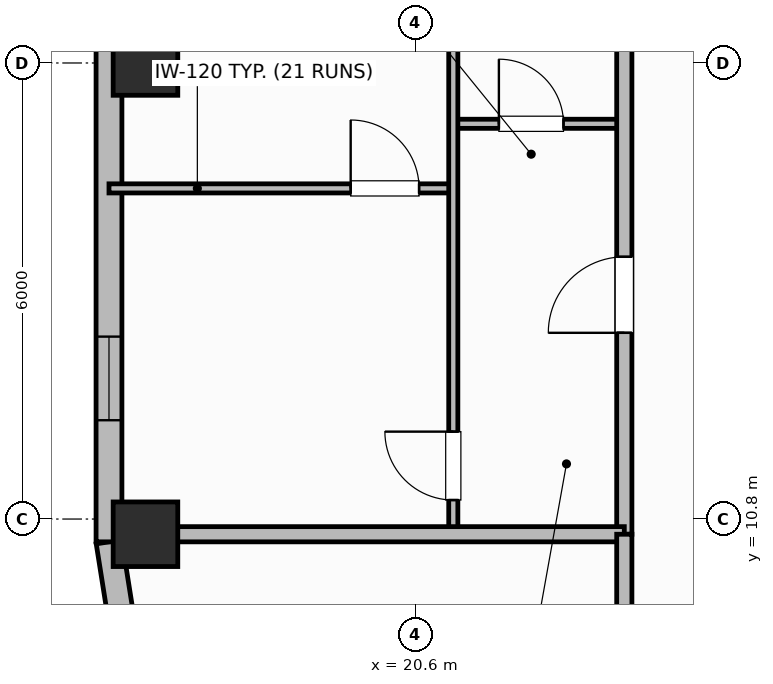
"""IFC4 building model, lengths in metres.
Left out: names, types, materials, properties, quantities, classifications, styles, units other than length and angle.
Written with IfcOpenShell. Run it as: python <this file> out.ifc"""

import sys

from ifc_helpers import new_model, si_unit, direction, frame, frame_2d, origin, origin_2d, place, context, subcontext, project, spatial, rectangle, extrude, element, fill, save


model = new_model("IFC4")
c1 = context("Model", 3, precision=1e-05, world=origin(), true_north=direction((0.0, 1.0)))
c2 = subcontext(c1, "Body", "Model", "MODEL_VIEW")
j1 = project(units=[si_unit("LENGTHUNIT", "METRE"), si_unit("PLANEANGLEUNIT", "RADIAN")], contexts=[c1])
p1 = place(None, origin())
s1 = spatial("IfcSite", under=j1, at=p1, CompositionType="ELEMENT")
p2 = place(p1, origin())
s2 = spatial("IfcBuilding", under=s1, at=p2, CompositionType="ELEMENT")
p3 = place(p2, frame((0.0, 0.0, 214.7)))
s3 = spatial("IfcBuildingStorey", under=s2, at=p3, CompositionType="ELEMENT", Elevation=214.7)
for number, where, z_axis, x_axis in (
    (1, (17.05, 10.6, 0.0), (0.0, 0.0, 1.0), (1.0, 0.0, 0.0)),
    (2, (17.05, 16.8, 0.0), (0.0, 0.0, 1.0), (1.0, 0.0, 0.0)),
):
    element("IfcColumn", number, at=place(p3, frame(where, z_axis=z_axis, x_axis=x_axis)), inside=s3, PredefinedType="COLUMN", context=c2, shape_type="SweptSolid", body=[
        extrude(rectangle(XDim=0.85, YDim=0.85, at=origin_2d()), origin(), (0.0, 0.0, 1.0), 3.7),
    ])
p4 = place(p3, frame((16.57, 10.5, 0.0), z_axis=(0.0, 0.0, 1.0), x_axis=(0.156514556949, -0.987675651954, 0.0)))
e3 = element("IfcWall", 3, at=p4, inside=s3, PredefinedType="SOLIDWALL", context=c2, shape_type="SweptSolid", body=[
    extrude(rectangle(XDim=1.135, YDim=0.34, at=frame_2d((0.568, 0.0))), origin(), (0.0, 0.0, 1.0), 2.72),
])
p5 = place(p3, frame((16.57, 23.8, 0.0), z_axis=(0.0, 0.0, 1.0), x_axis=(0.0, -1.0, 0.0)))
e4 = element("IfcWall", 4, at=p5, inside=s3, PredefinedType="SOLIDWALL", context=c2, shape_type="SweptSolid", body=[
    extrude(rectangle(XDim=13.3, YDim=0.34, at=frame_2d((6.65, 0.0))), origin(), (0.0, 0.0, 1.0), 2.72),
])
p6 = place(p5, frame((2.1, 0.0, 0.0)))
e5 = element("IfcOpeningElement", 5, at=p6, cuts=e4, PredefinedType="OPENING", context=c2, shape_type="SweptSolid", body=[
    extrude(rectangle(XDim=1.6, YDim=2.1, at=frame_2d((0.8, 1.05))), frame((0.0, 0.18, 0.0), z_axis=(0.0, -1.0, 0.0), x_axis=(1.0, 0.0, 0.0)), (0.0, 0.0, 1.0), 0.36),
])
p7 = place(p5, frame((4.6, 0.0, 0.95)))
e6 = element("IfcOpeningElement", 6, at=p7, cuts=e4, PredefinedType="OPENING", context=c2, shape_type="SweptSolid", body=[
    extrude(rectangle(XDim=1.1, YDim=1.65, at=frame_2d((0.55, 0.825))), frame((0.0, 0.18, 0.0), z_axis=(0.0, -1.0, 0.0), x_axis=(1.0, 0.0, 0.0)), (0.0, 0.0, 1.0), 0.36),
])
p8 = place(p5, frame((10.6, 0.0, 0.95)))
e7 = element("IfcOpeningElement", 7, at=p8, cuts=e4, PredefinedType="OPENING", context=c2, shape_type="SweptSolid", body=[
    extrude(rectangle(XDim=1.1, YDim=1.65, at=frame_2d((0.55, 0.825))), frame((0.0, 0.18, 0.0), z_axis=(0.0, -1.0, 0.0), x_axis=(1.0, 0.0, 0.0)), (0.0, 0.0, 1.0), 0.36),
])
p9 = place(p3, frame((21.1, 16.0, 0.0), z_axis=(0.0, 0.0, 1.0), x_axis=(1.0, 0.0, 0.0)))
e8 = element("IfcWall", 8, at=p9, inside=s3, PredefinedType="PARTITIONING", context=c2, shape_type="SweptSolid", body=[
    extrude(rectangle(XDim=2.25, YDim=0.12, at=frame_2d((1.125, 0.0))), origin(), (0.0, 0.0, 1.0), 2.55),
])
p10 = place(p9, frame((0.6, 0.0, 0.0)))
e9 = element("IfcOpeningElement", 9, at=p10, cuts=e8, PredefinedType="OPENING", context=c2, shape_type="SweptSolid", body=[
    extrude(rectangle(XDim=0.85, YDim=2.1, at=frame_2d((0.425, 1.05))), frame((0.0, 0.07, 0.0), z_axis=(0.0, -1.0, 0.0), x_axis=(1.0, 0.0, 0.0)), (0.0, 0.0, 1.0), 0.14),
])
p11 = place(p3, frame((16.57, 15.15, 0.0), z_axis=(0.0, 0.0, 1.0), x_axis=(1.0, 0.0, 0.0)))
e10 = element("IfcWall", 10, at=p11, inside=s3, PredefinedType="PARTITIONING", context=c2, shape_type="SweptSolid", body=[
    extrude(rectangle(XDim=4.53, YDim=0.12, at=frame_2d((2.265, 0.0))), origin(), (0.0, 0.0, 1.0), 2.55),
])
p12 = place(p11, frame((3.18, 0.0, 0.0)))
e11 = element("IfcOpeningElement", 11, at=p12, cuts=e10, PredefinedType="OPENING", context=c2, shape_type="SweptSolid", body=[
    extrude(rectangle(XDim=0.9, YDim=2.1, at=frame_2d((0.45, 1.05))), frame((0.0, 0.07, 0.0), z_axis=(0.0, -1.0, 0.0), x_axis=(1.0, 0.0, 0.0)), (0.0, 0.0, 1.0), 0.14),
])
p13 = place(p3, frame((21.1, 10.64, 0.0), z_axis=(0.0, 0.0, 1.0), x_axis=(0.0, 1.0, 0.0)))
e12 = element("IfcWall", 12, at=p13, inside=s3, PredefinedType="PARTITIONING", context=c2, shape_type="SweptSolid", body=[
    extrude(rectangle(XDim=15.76, YDim=0.12, at=frame_2d((7.88, 0.0))), origin(), (0.0, 0.0, 1.0), 2.55),
])
p14 = place(p13, frame((0.41, 0.0, 0.0)))
e13 = element("IfcOpeningElement", 13, at=p14, cuts=e12, PredefinedType="OPENING", context=c2, shape_type="SweptSolid", body=[
    extrude(rectangle(XDim=0.9, YDim=2.1, at=frame_2d((0.45, 1.05))), frame((0.0, 0.07, 0.0), z_axis=(0.0, -1.0, 0.0), x_axis=(1.0, 0.0, 0.0)), (0.0, 0.0, 1.0), 0.14),
])
p15 = place(p13, frame((13.492, 0.0, 0.0)))
e14 = element("IfcOpeningElement", 14, at=p15, cuts=e12, PredefinedType="OPENING", context=c2, shape_type="SweptSolid", body=[
    extrude(rectangle(XDim=0.82, YDim=2.08, at=frame_2d((0.41, 1.04))), frame((0.0, 0.07, 0.0), z_axis=(0.0, -1.0, 0.0), x_axis=(1.0, 0.0, 0.0)), (0.0, 0.0, 1.0), 0.14),
])
p16 = place(p3, frame((23.35, 10.6, 0.0), z_axis=(0.0, 0.0, 1.0), x_axis=(0.0, 1.0, 0.0)))
e15 = element("IfcWall", 15, at=p16, inside=s3, PredefinedType="PARTITIONING", context=c2, shape_type="SweptSolid", body=[
    extrude(rectangle(XDim=35.2, YDim=0.2, at=frame_2d((17.6, 0.0))), origin(), (0.0, 0.0, 1.0), 2.55),
])
p17 = place(p16, frame((2.65, 0.0, 0.0)))
e16 = element("IfcOpeningElement", 16, at=p17, cuts=e15, PredefinedType="OPENING", context=c2, shape_type="SweptSolid", body=[
    extrude(rectangle(XDim=1.0, YDim=2.15, at=frame_2d((0.5, 1.075))), frame((0.0, 0.11, 0.0), z_axis=(0.0, -1.0, 0.0), x_axis=(1.0, 0.0, 0.0)), (0.0, 0.0, 1.0), 0.22),
])
p18 = place(p16, frame((19.79, 0.0, 0.0)))
e17 = element("IfcOpeningElement", 17, at=p18, cuts=e15, PredefinedType="OPENING", context=c2, shape_type="SweptSolid", body=[
    extrude(rectangle(XDim=1.0, YDim=2.15, at=frame_2d((0.5, 1.075))), frame((0.0, 0.11, 0.0), z_axis=(0.0, -1.0, 0.0), x_axis=(1.0, 0.0, 0.0)), (0.0, 0.0, 1.0), 0.22),
])
p19 = place(p3, frame((16.99, 10.6, 0.0), z_axis=(0.0, 0.0, 1.0), x_axis=(1.0, 0.0, 0.0)))
e18 = element("IfcWall", 18, at=p19, inside=s3, PredefinedType="PARTITIONING", context=c2, shape_type="SweptSolid", body=[
    extrude(rectangle(XDim=6.36, YDim=0.2, at=frame_2d((3.18, 0.0))), origin(), (0.0, 0.0, 1.0), 2.55),
])
p20 = place(p3, frame((23.35, 6.87, 0.0), z_axis=(0.0, 0.0, 1.0), x_axis=(0.0, 1.0, 0.0)))
e19 = element("IfcWall", 19, at=p20, inside=s3, PredefinedType="PARTITIONING", context=c2, shape_type="SweptSolid", body=[
    extrude(rectangle(XDim=3.73, YDim=0.2, at=frame_2d((1.865, 0.0))), origin(), (0.0, 0.0, 1.0), 2.55),
])
p21 = place(p8, origin())
e20 = element("IfcWindow", 20, at=p21, inside=s3, PartitioningType="SINGLE_PANEL", PredefinedType="WINDOW", context=c2, shape_type="SweptSolid", body=[
    extrude(rectangle(XDim=1.1, YDim=1.65, at=frame_2d((0.55, 0.825))), frame((0.0, 0.03, 0.0), z_axis=(0.0, -1.0, 0.0), x_axis=(1.0, 0.0, 0.0)), (0.0, 0.0, 1.0), 0.06),
])
fill(e7, e20)
p22 = place(p10, origin())
e21 = element("IfcDoor", 21, at=p22, inside=s3, OperationType="SINGLE_SWING_LEFT", PredefinedType="DOOR", context=c2, shape_type="SweptSolid", body=[
    extrude(rectangle(XDim=0.85, YDim=2.1, at=frame_2d((0.425, 1.05))), frame((0.0, 0.025, 0.0), z_axis=(0.0, -1.0, 0.0), x_axis=(1.0, 0.0, 0.0)), (0.0, 0.0, 1.0), 0.05),
])
fill(e9, e21)
p23 = place(p12, origin())
e22 = element("IfcDoor", 22, at=p23, inside=s3, OperationType="SINGLE_SWING_LEFT", PredefinedType="DOOR", context=c2, shape_type="SweptSolid", body=[
    extrude(rectangle(XDim=0.9, YDim=2.1, at=frame_2d((0.45, 1.05))), frame((0.0, 0.025, 0.0), z_axis=(0.0, -1.0, 0.0), x_axis=(1.0, 0.0, 0.0)), (0.0, 0.0, 1.0), 0.05),
])
fill(e11, e22)
p24 = place(p14, origin())
e23 = element("IfcDoor", 23, at=p24, inside=s3, OperationType="SINGLE_SWING_RIGHT", PredefinedType="DOOR", context=c2, shape_type="SweptSolid", body=[
    extrude(rectangle(XDim=0.9, YDim=2.1, at=frame_2d((0.45, 1.05))), frame((0.0, 0.025, 0.0), z_axis=(0.0, -1.0, 0.0), x_axis=(1.0, 0.0, 0.0)), (0.0, 0.0, 1.0), 0.05),
])
fill(e13, e23)
p25 = place(p17, origin())
e24 = element("IfcDoor", 24, at=p25, inside=s3, OperationType="SINGLE_SWING_LEFT", PredefinedType="DOOR", context=c2, shape_type="SweptSolid", body=[
    extrude(rectangle(XDim=1.0, YDim=2.15, at=frame_2d((0.5, 1.075))), frame((0.0, 0.025, 0.0), z_axis=(0.0, -1.0, 0.0), x_axis=(1.0, 0.0, 0.0)), (0.0, 0.0, 1.0), 0.05),
])
fill(e16, e24)
save(model, sys.argv[1])
